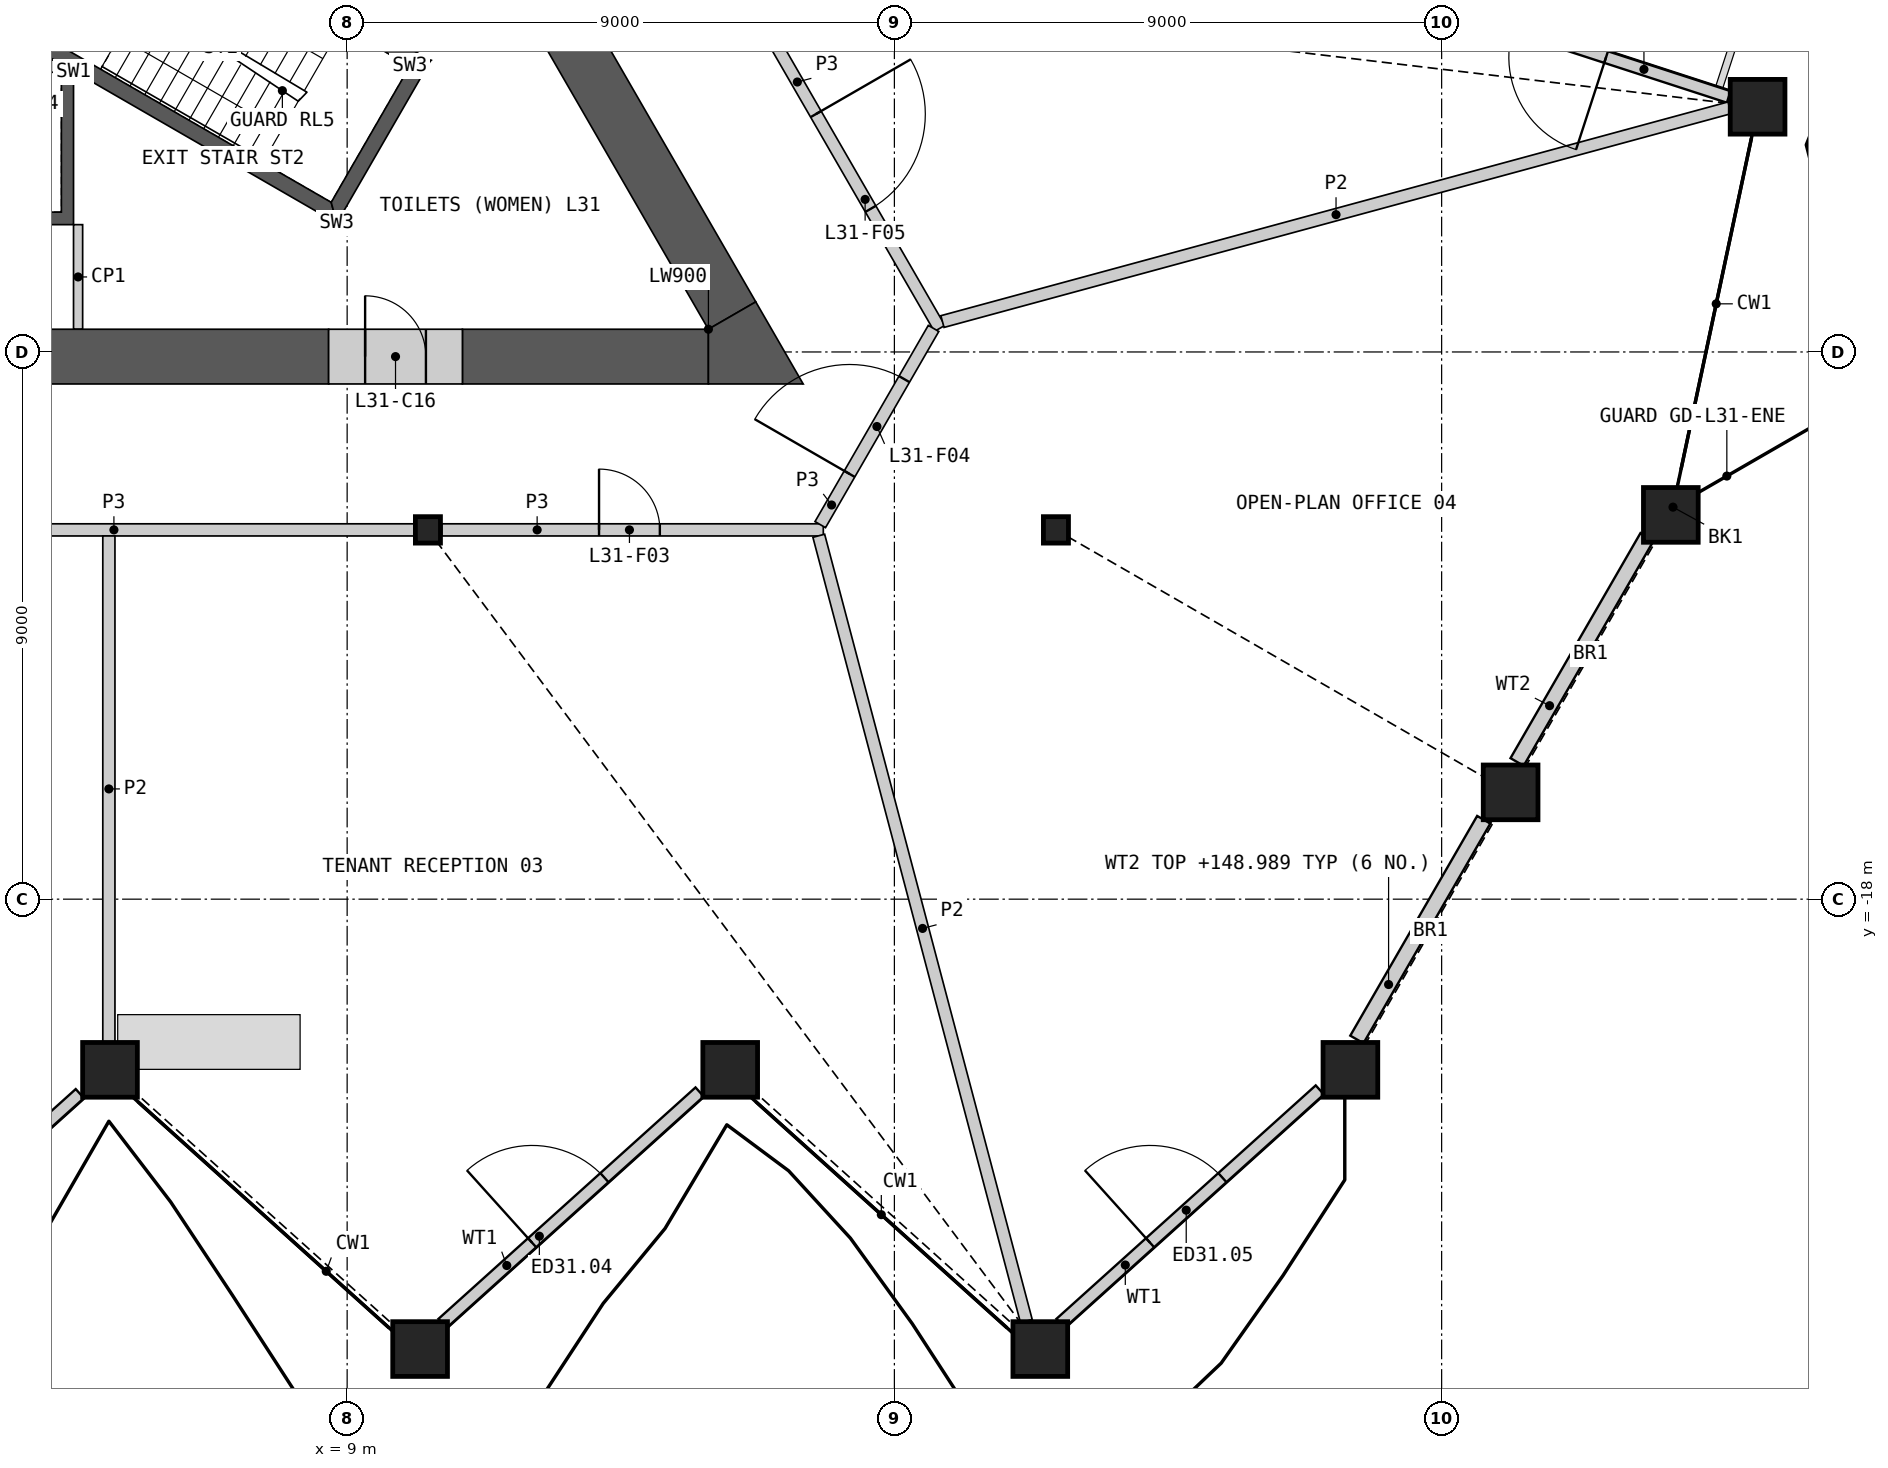
"""IFC4 building model, lengths in metres.
Left out: names, types, materials, properties, quantities, classifications, styles, units other than length and angle.
Written with IfcOpenShell. Run it as: python <this file> out.ifc"""

import sys

from ifc_helpers import new_model, si_unit, direction, frame, frame_2d, origin, origin_2d, place, context, subcontext, project, spatial, polyline, rectangle, hollow_rectangle, i_section, outline, extrude, element, fill, save


model = new_model("IFC4")
c1 = context("Model", 3, precision=1e-05, world=origin(), true_north=direction((0.0, 1.0)))
c2 = subcontext(c1, "Body", "Model", "MODEL_VIEW")
j1 = project(units=[si_unit("LENGTHUNIT", "METRE"), si_unit("PLANEANGLEUNIT", "RADIAN")], contexts=[c1])
p1 = place(None, origin())
s1 = spatial("IfcSite", under=j1, at=p1, CompositionType="ELEMENT")
p2 = place(p1, origin())
s2 = spatial("IfcBuilding", under=s1, at=p2, CompositionType="ELEMENT")
p3 = place(p2, frame((0.0, 0.0, 145.8)))
s3 = spatial("IfcBuildingStorey", under=s2, at=p3, CompositionType="ELEMENT", Elevation=145.8)
for number, where, z_axis, x_axis in (
    (1, (5.1, -20.807, 0.0), (0.0, 0.0, 1.0), (1.0, 0.0, 0.0)),
    (2, (10.2, -25.399, 0.0), (0.0, 0.0, 1.0), (1.0, 0.0, 0.0)),
    (3, (15.3, -20.807, 0.0), (0.0, 0.0, 1.0), (1.0, 0.0, 0.0)),
    (4, (20.4, -25.399, 0.0), (0.0, 0.0, 1.0), (1.0, 0.0, 0.0)),
    (5, (25.5, -20.807, 0.0), (0.0, 0.0, 1.0), (1.0, 0.0, 0.0)),
    (6, (28.135, -16.243, 0.0), (0.0, 0.0, 1.0), (1.0, 0.0, 0.0)),
    (7, (30.769, -11.68, 0.0), (0.0, 0.0, 1.0), (1.0, 0.0, 0.0)),
    (8, (32.196, -4.967, 0.0), (0.0, 0.0, 1.0), (1.0, 0.0, 0.0)),
):
    element("IfcColumn", number, at=place(p3, frame(where, z_axis=z_axis, x_axis=x_axis)), inside=s3, PredefinedType="COLUMN", context=c2, shape_type="SweptSolid", body=[
        extrude(hollow_rectangle(XDim=0.9, YDim=0.9, WallThickness=0.06, at=origin_2d()), origin(), (0.0, 0.0, 1.0), 4.2),
    ])
for number, where, z_axis, x_axis in (
    (9, (10.328, -11.926, 0.0), (0.0, 0.0, 1.0), (1.0, 0.0, 0.0)),
    (10, (20.657, -11.926, 0.0), (0.0, 0.0, 1.0), (1.0, 0.0, 0.0)),
):
    element("IfcColumn", number, at=place(p3, frame(where, z_axis=z_axis, x_axis=x_axis)), inside=s3, PredefinedType="COLUMN", context=c2, shape_type="SweptSolid", body=[
        extrude(i_section(OverallWidth=0.412, OverallDepth=0.435, WebThickness=0.036, FlangeThickness=0.057, at=origin_2d()), origin(), (0.0, 0.0, 1.0), 4.2),
    ])
p4 = place(p3, frame((0.406, -24.977, 0.0), z_axis=(0.0, 0.0, 1.0), x_axis=(0.743158726114, 0.669115167815, 0.0)))
e11 = element("IfcWall", 11, at=p4, inside=s3, PredefinedType="SOLIDWALL", context=c2, shape_type="SweptSolid", body=[
    extrude(rectangle(XDim=5.648, YDim=0.2, at=frame_2d((2.824, 0.0))), origin(), (0.0, 0.0, 1.0), 3.189),
])
p5 = place(p4, frame((1.983, 0.0, 0.0)))
e12 = element("IfcOpeningElement", 12, at=p5, cuts=e11, PredefinedType="OPENING", context=c2, shape_type="SweptSolid", body=[
    extrude(rectangle(XDim=1.6, YDim=2.4, at=frame_2d((0.8, 1.2))), frame((0.0, 0.11, 0.0), z_axis=(0.0, -1.0, 0.0), x_axis=(1.0, 0.0, 0.0)), (0.0, 0.0, 1.0), 0.22),
])
p6 = place(p3, frame((10.569, -24.977, 0.0), z_axis=(0.0, 0.0, 1.0), x_axis=(0.743151159824, 0.669123571287, 0.0)))
e13 = element("IfcWall", 13, at=p6, inside=s3, PredefinedType="SOLIDWALL", context=c2, shape_type="SweptSolid", body=[
    extrude(rectangle(XDim=5.689, YDim=0.2, at=frame_2d((2.844, 0.0))), origin(), (0.0, 0.0, 1.0), 3.189),
])
p7 = place(p6, frame((1.983, 0.0, 0.0)))
e14 = element("IfcOpeningElement", 14, at=p7, cuts=e13, PredefinedType="OPENING", context=c2, shape_type="SweptSolid", body=[
    extrude(rectangle(XDim=1.6, YDim=2.4, at=frame_2d((0.8, 1.2))), frame((0.0, 0.11, 0.0), z_axis=(0.0, -1.0, 0.0), x_axis=(1.0, 0.0, 0.0)), (0.0, 0.0, 1.0), 0.22),
])
p8 = place(p3, frame((20.731, -24.977, 0.0), z_axis=(0.0, 0.0, 1.0), x_axis=(0.743150280241, 0.669124548181, 0.0)))
e15 = element("IfcWall", 15, at=p8, inside=s3, PredefinedType="SOLIDWALL", context=c2, shape_type="SweptSolid", body=[
    extrude(rectangle(XDim=5.739, YDim=0.2, at=frame_2d((2.869, 0.0))), origin(), (0.0, 0.0, 1.0), 3.189),
])
p9 = place(p8, frame((1.983, 0.0, 0.0)))
e16 = element("IfcOpeningElement", 16, at=p9, cuts=e15, PredefinedType="OPENING", context=c2, shape_type="SweptSolid", body=[
    extrude(rectangle(XDim=1.6, YDim=2.4, at=frame_2d((0.8, 1.2))), frame((0.0, 0.11, 0.0), z_axis=(0.0, -1.0, 0.0), x_axis=(1.0, 0.0, 0.0)), (0.0, 0.0, 1.0), 0.22),
])
p10 = place(p3, frame((25.606, -20.307, 0.0), z_axis=(0.0, 0.0, 1.0), x_axis=(0.500002690545, 0.866023850392, 0.0)))
e17 = element("IfcWall", 17, at=p10, inside=s3, PredefinedType="SOLIDWALL", context=c2, shape_type="SweptSolid", body=[
    extrude(rectangle(XDim=4.173, YDim=0.25, at=frame_2d((2.086, 0.0))), origin(), (0.0, 0.0, 1.0), 3.189),
])
p11 = place(p3, frame((28.241, -15.743, 0.0), z_axis=(0.0, 0.0, 1.0), x_axis=(0.499995966399, 0.866027732573, 0.0)))
e18 = element("IfcWall", 18, at=p11, inside=s3, PredefinedType="SOLIDWALL", context=c2, shape_type="SweptSolid", body=[
    extrude(rectangle(XDim=4.275, YDim=0.25, at=frame_2d((2.138, 0.0))), origin(), (0.0, 0.0, 1.0), 3.189),
])
p12 = place(p3, frame((31.721, -4.805, 0.0), z_axis=(0.0, 0.0, 1.0), x_axis=(-0.951053952554, 0.309024884649, 0.0)))
e19 = element("IfcWall", 19, at=p12, inside=s3, PredefinedType="SOLIDWALL", context=c2, shape_type="SweptSolid", body=[
    extrude(rectangle(XDim=5.865, YDim=0.2, at=frame_2d((2.932, 0.0))), origin(), (0.0, 0.0, 1.0), 2.885),
])
p13 = place(p12, frame((2.12, 0.0, 0.0)))
e20 = element("IfcOpeningElement", 20, at=p13, cuts=e19, PredefinedType="OPENING", context=c2, shape_type="SweptSolid", body=[
    extrude(rectangle(XDim=1.6, YDim=2.4, at=frame_2d((0.8, 1.2))), frame((0.0, 0.11, 0.0), z_axis=(0.0, -1.0, 0.0), x_axis=(1.0, 0.0, 0.0)), (0.0, 0.0, 1.0), 0.22),
])
p14 = place(p3, origin())
e21 = element("IfcWall", 21, at=p14, inside=s3, PredefinedType="SHEAR", context=c2, shape_type="SweptSolid", body=[
    extrude(outline(polyline([(4.5, -4.4), (4.5, -6.906), (-4.5, -6.906), (-4.5, -4.4), (-4.3, -4.4), (-4.3, -6.7), (-2.3, -6.7), (-2.3, -4.4), (-2.1, -4.4), (-2.1, -6.7), (-0.1, -6.7), (-0.1, -4.4), (0.1, -4.4), (0.1, -6.7), (2.1, -6.7), (2.1, -4.4), (2.3, -4.4), (2.3, -6.7), (4.3, -6.7), (4.3, -4.4), (4.5, -4.4)])), origin(), (0.0, 0.0, 1.0), 3.8),
])
p15 = place(p3, frame((-4.187, -4.3, 0.0), z_axis=(0.0, 0.0, 1.0), x_axis=(1.0, 0.0, 0.0)))
e22 = element("IfcWall", 22, at=p15, inside=s3, PredefinedType="SOLIDWALL", context=c2, shape_type="SweptSolid", body=[
    extrude(rectangle(XDim=8.373, YDim=0.2, at=frame_2d((4.187, 0.0))), origin(), (0.0, 0.0, 1.0), 3.8),
])
p16 = place(p15, frame((0.287, 0.0, 0.0)))
e23 = element("IfcOpeningElement", 23, at=p16, cuts=e22, PredefinedType="OPENING", context=c2, shape_type="SweptSolid", body=[
    extrude(rectangle(XDim=1.2, YDim=2.1, at=frame_2d((0.6, 1.05))), frame((0.0, 0.11, 0.0), z_axis=(0.0, -1.0, 0.0), x_axis=(1.0, 0.0, 0.0)), (0.0, 0.0, 1.0), 0.22),
])
p17 = place(p15, frame((2.387, 0.0, 0.0)))
e24 = element("IfcOpeningElement", 24, at=p17, cuts=e22, PredefinedType="OPENING", context=c2, shape_type="SweptSolid", body=[
    extrude(rectangle(XDim=1.4, YDim=2.1, at=frame_2d((0.7, 1.05))), frame((0.0, 0.11, 0.0), z_axis=(0.0, -1.0, 0.0), x_axis=(1.0, 0.0, 0.0)), (0.0, 0.0, 1.0), 0.22),
])
p18 = place(p15, frame((4.737, 0.0, 0.0)))
e25 = element("IfcOpeningElement", 25, at=p18, cuts=e22, PredefinedType="OPENING", context=c2, shape_type="SweptSolid", body=[
    extrude(rectangle(XDim=1.1, YDim=2.1, at=frame_2d((0.55, 1.05))), frame((0.0, 0.11, 0.0), z_axis=(0.0, -1.0, 0.0), x_axis=(1.0, 0.0, 0.0)), (0.0, 0.0, 1.0), 0.22),
])
p19 = place(p15, frame((6.887, 0.0, 0.0)))
e26 = element("IfcOpeningElement", 26, at=p19, cuts=e22, PredefinedType="OPENING", context=c2, shape_type="SweptSolid", body=[
    extrude(rectangle(XDim=1.2, YDim=2.1, at=frame_2d((0.6, 1.05))), frame((0.0, 0.11, 0.0), z_axis=(0.0, -1.0, 0.0), x_axis=(1.0, 0.0, 0.0)), (0.0, 0.0, 1.0), 0.22),
])
p20 = place(p3, origin())
e27 = element("IfcWall", 27, at=p20, inside=s3, PredefinedType="SHEAR", context=c2, shape_type="SweptSolid", body=[
    extrude(outline(polyline([(3.763, -3.956), (8.83, -6.881), (8.738, -6.539), (3.888, -3.739), (3.763, -3.956)])), origin(), (0.0, 0.0, 1.0), 3.8),
])
p21 = place(p3, origin())
e28 = element("IfcWall", 28, at=p21, inside=s3, PredefinedType="SHEAR", context=c2, shape_type="SweptSolid", body=[
    extrude(outline(polyline([(8.83, -6.881), (10.374, -4.206), (10.032, -4.298), (8.738, -6.539), (8.83, -6.881)])), origin(), (0.0, 0.0, 1.0), 3.8),
])
p22 = place(p3, origin())
e29 = element("IfcWall", 29, at=p22, inside=s3, PredefinedType="SHEAR", context=c2, shape_type="SweptSolid", body=[
    extrude(outline(polyline([(10.032, -4.298), (10.374, -4.206), (5.307, -1.281), (5.182, -1.498), (10.032, -4.298)])), origin(), (0.0, 0.0, 1.0), 3.8),
])
p23 = place(p3, frame((4.575, -6.906, 0.0), z_axis=(0.0, 0.0, 1.0), x_axis=(0.0, -1.0, 0.0)))
e30 = element("IfcWall", 30, at=p23, inside=s3, PredefinedType="PARTITIONING", context=c2, shape_type="SweptSolid", body=[
    extrude(rectangle(XDim=1.72, YDim=0.15, at=frame_2d((0.86, 0.0))), origin(), (0.0, 0.0, 1.0), 3.8),
])
p24 = place(p3, frame((1.1, -9.076, 0.0), z_axis=(0.0, 0.0, 1.0), x_axis=(1.0, 0.0, 0.0)))
e31 = element("IfcWall", 31, at=p24, inside=s3, PredefinedType="SHEAR", context=c2, shape_type="SweptSolid", body=[
    extrude(rectangle(XDim=7.595, YDim=0.9, at=frame_2d((3.798, 0.0))), origin(), (0.0, 0.0, 1.0), 3.8),
])
p25 = place(p3, frame((10.896, -9.076, 0.0), z_axis=(0.0, 0.0, 1.0), x_axis=(1.0, 0.0, 0.0)))
e32 = element("IfcWall", 32, at=p25, inside=s3, PredefinedType="SHEAR", context=c2, shape_type="SweptSolid", body=[
    extrude(rectangle(XDim=4.046, YDim=0.9, at=frame_2d((2.023, 0.0))), origin(), (0.0, 0.0, 1.0), 3.8),
])
p26 = place(p3, frame((15.331, -8.401, 0.0), z_axis=(0.0, 0.0, 1.0), x_axis=(-0.499995375004, 0.86602807401, 0.0)))
e33 = element("IfcWall", 33, at=p26, inside=s3, PredefinedType="SHEAR", context=c2, shape_type="SweptSolid", body=[
    extrude(rectangle(XDim=11.718, YDim=0.9, at=frame_2d((5.859, 0.0))), origin(), (0.0, 0.0, 1.0), 3.8),
])
p27 = place(p3, origin())
e34 = element("IfcWall", 34, at=p27, inside=s3, PredefinedType="SHEAR", context=c2, shape_type="SweptSolid", body=[
    extrude(outline(polyline([(14.941, -8.626), (15.721, -8.176), (16.5, -9.526), (14.941, -9.526), (14.941, -8.626)])), origin(), (0.0, 0.0, 1.0), 3.8),
])
p28 = place(p3, frame((8.696, -9.076, 0.0), z_axis=(0.0, 0.0, 1.0), x_axis=(1.0, 0.0, 0.0)))
e35 = element("IfcWall", 35, at=p28, inside=s3, PredefinedType="SHEAR", context=c2, shape_type="SweptSolid", body=[
    extrude(rectangle(XDim=2.2, YDim=0.9, at=frame_2d((1.1, 0.0))), origin(), (0.0, 0.0, 1.0), 3.8),
])
p29 = place(p28, frame((0.6, 0.0, 0.0)))
e36 = element("IfcOpeningElement", 36, at=p29, cuts=e35, PredefinedType="OPENING", context=c2, shape_type="SweptSolid", body=[
    extrude(rectangle(XDim=1.0, YDim=2.1, at=frame_2d((0.5, 1.05))), frame((0.0, 0.46, 0.0), z_axis=(0.0, -1.0, 0.0), x_axis=(1.0, 0.0, 0.0)), (0.0, 0.0, 1.0), 0.92),
])
p30 = place(p3, frame((0.227, -11.926, 0.0), z_axis=(0.0, 0.0, 1.0), x_axis=(1.0, 0.0, 0.0)))
e37 = element("IfcWall", 37, at=p30, inside=s3, PredefinedType="PARTITIONING", context=c2, shape_type="SweptSolid", body=[
    extrude(rectangle(XDim=9.874, YDim=0.2, at=frame_2d((4.937, 0.0))), origin(), (0.0, 0.0, 1.0), 3.8),
])
p31 = place(p3, frame((10.556, -11.926, 0.0), z_axis=(0.0, 0.0, 1.0), x_axis=(1.0, 0.0, 0.0)))
e38 = element("IfcWall", 38, at=p31, inside=s3, PredefinedType="PARTITIONING", context=c2, shape_type="SweptSolid", body=[
    extrude(rectangle(XDim=6.275, YDim=0.2, at=frame_2d((3.137, 0.0))), origin(), (0.0, 0.0, 1.0), 3.8),
])
p32 = place(p31, frame((2.587, 0.0, 0.0)))
e39 = element("IfcOpeningElement", 39, at=p32, cuts=e38, PredefinedType="OPENING", context=c2, shape_type="SweptSolid", body=[
    extrude(rectangle(XDim=1.0, YDim=2.1, at=frame_2d((0.5, 1.05))), frame((0.0, 0.11, 0.0), z_axis=(0.0, -1.0, 0.0), x_axis=(1.0, 0.0, 0.0)), (0.0, 0.0, 1.0), 0.22),
])
p33 = place(p3, frame((15.624, -3.209, 0.0), z_axis=(0.0, 0.0, 1.0), x_axis=(0.499997920671, -0.866026604282, 0.0)))
e40 = element("IfcWall", 40, at=p33, inside=s3, PredefinedType="PARTITIONING", context=c2, shape_type="SweptSolid", body=[
    extrude(rectangle(XDim=6.24, YDim=0.2, at=frame_2d((3.12, 0.0))), origin(), (0.0, 0.0, 1.0), 3.8),
])
p34 = place(p33, frame((2.169, 0.0, 0.0)))
e41 = element("IfcOpeningElement", 41, at=p34, cuts=e40, PredefinedType="OPENING", context=c2, shape_type="SweptSolid", body=[
    extrude(rectangle(XDim=1.8, YDim=2.1, at=frame_2d((0.9, 1.05))), frame((0.0, 0.11, 0.0), z_axis=(0.0, -1.0, 0.0), x_axis=(1.0, 0.0, 0.0)), (0.0, 0.0, 1.0), 0.22),
])
p35 = place(p3, frame((16.781, -11.84, 0.0), z_axis=(0.0, 0.0, 1.0), x_axis=(0.499958791762, 0.866049194065, 0.0)))
e42 = element("IfcWall", 42, at=p35, inside=s3, PredefinedType="PARTITIONING", context=c2, shape_type="SweptSolid", body=[
    extrude(rectangle(XDim=3.726, YDim=0.2, at=frame_2d((1.863, 0.0))), origin(), (0.0, 0.0, 1.0), 3.8),
])
p36 = place(p35, frame((0.963, 0.0, 0.0)))
e43 = element("IfcOpeningElement", 43, at=p36, cuts=e42, PredefinedType="OPENING", context=c2, shape_type="SweptSolid", body=[
    extrude(rectangle(XDim=1.8, YDim=2.1, at=frame_2d((0.9, 1.05))), frame((0.0, 0.11, 0.0), z_axis=(0.0, -1.0, 0.0), x_axis=(1.0, 0.0, 0.0)), (0.0, 0.0, 1.0), 0.22),
])
p37 = place(p3, frame((18.79, -8.5, 0.0), z_axis=(0.0, 0.0, 1.0), x_axis=(0.965038802525, 0.262107057556, 0.0)))
e44 = element("IfcWall", 44, at=p37, inside=s3, PredefinedType="PARTITIONING", context=c2, shape_type="SweptSolid", body=[
    extrude(rectangle(XDim=13.415, YDim=0.2, at=frame_2d((6.708, 0.0))), origin(), (0.0, 0.0, 1.0), 2.885),
])
p38 = place(p3, frame((16.756, -12.023, 0.0), z_axis=(0.0, 0.0, 1.0), x_axis=(0.25554647156, -0.966796773305, 0.0)))
e45 = element("IfcWall", 45, at=p38, inside=s3, PredefinedType="PARTITIONING", context=c2, shape_type="SweptSolid", body=[
    extrude(rectangle(XDim=13.36, YDim=0.2, at=frame_2d((6.68, 0.0))), origin(), (0.0, 0.0, 1.0), 2.885),
])
p39 = place(p3, frame((5.081, -20.347, 0.0), z_axis=(0.0, 0.0, 1.0), x_axis=(0.0, 1.0, 0.0)))
e46 = element("IfcWall", 46, at=p39, inside=s3, PredefinedType="PARTITIONING", context=c2, shape_type="SweptSolid", body=[
    extrude(rectangle(XDim=8.321, YDim=0.2, at=frame_2d((4.16, 0.0))), origin(), (0.0, 0.0, 1.0), 2.885),
])
p40 = place(p7, origin())
e47 = element("IfcDoor", 47, at=p40, inside=s3, OperationType="DOUBLE_DOOR_SINGLE_SWING", PredefinedType="DOOR", context=c2, shape_type="SweptSolid", body=[
    extrude(rectangle(XDim=1.6, YDim=2.4, at=frame_2d((0.8, 1.2))), frame((0.0, 0.025, 0.0), z_axis=(0.0, -1.0, 0.0), x_axis=(1.0, 0.0, 0.0)), (0.0, 0.0, 1.0), 0.05),
])
fill(e14, e47)
p41 = place(p9, origin())
e48 = element("IfcDoor", 48, at=p41, inside=s3, OperationType="DOUBLE_DOOR_SINGLE_SWING", PredefinedType="DOOR", context=c2, shape_type="SweptSolid", body=[
    extrude(rectangle(XDim=1.6, YDim=2.4, at=frame_2d((0.8, 1.2))), frame((0.0, 0.025, 0.0), z_axis=(0.0, -1.0, 0.0), x_axis=(1.0, 0.0, 0.0)), (0.0, 0.0, 1.0), 0.05),
])
fill(e16, e48)
p42 = place(p13, origin())
e49 = element("IfcDoor", 49, at=p42, inside=s3, OperationType="DOUBLE_DOOR_SINGLE_SWING", PredefinedType="DOOR", context=c2, shape_type="SweptSolid", body=[
    extrude(rectangle(XDim=1.6, YDim=2.4, at=frame_2d((0.8, 1.2))), frame((0.0, 0.025, 0.0), z_axis=(0.0, -1.0, 0.0), x_axis=(1.0, 0.0, 0.0)), (0.0, 0.0, 1.0), 0.05),
])
fill(e20, e49)
p43 = place(p29, origin())
e50 = element("IfcDoor", 50, at=p43, inside=s3, OperationType="SINGLE_SWING_LEFT", PredefinedType="DOOR", context=c2, shape_type="SweptSolid", body=[
    extrude(rectangle(XDim=1.0, YDim=2.1, at=frame_2d((0.5, 1.05))), frame((0.0, 0.205, 0.0), z_axis=(0.0, -1.0, 0.0), x_axis=(1.0, 0.0, 0.0)), (0.0, 0.0, 1.0), 0.05),
])
fill(e36, e50)
p44 = place(p32, origin())
e51 = element("IfcDoor", 51, at=p44, inside=s3, OperationType="SINGLE_SWING_LEFT", PredefinedType="DOOR", context=c2, shape_type="SweptSolid", body=[
    extrude(rectangle(XDim=1.0, YDim=2.1, at=frame_2d((0.5, 1.05))), frame((0.0, 0.025, 0.0), z_axis=(0.0, -1.0, 0.0), x_axis=(1.0, 0.0, 0.0)), (0.0, 0.0, 1.0), 0.05),
])
fill(e39, e51)
p45 = place(p36, origin())
e52 = element("IfcDoor", 52, at=p45, inside=s3, OperationType="DOUBLE_DOOR_SINGLE_SWING", PredefinedType="DOOR", context=c2, shape_type="SweptSolid", body=[
    extrude(rectangle(XDim=1.8, YDim=2.1, at=frame_2d((0.9, 1.05))), frame((0.0, 0.025, 0.0), z_axis=(0.0, -1.0, 0.0), x_axis=(1.0, 0.0, 0.0)), (0.0, 0.0, 1.0), 0.05),
])
fill(e43, e52)
p46 = place(p34, origin())
e53 = element("IfcDoor", 53, at=p46, inside=s3, OperationType="DOUBLE_DOOR_SINGLE_SWING", PredefinedType="DOOR", context=c2, shape_type="SweptSolid", body=[
    extrude(rectangle(XDim=1.8, YDim=2.1, at=frame_2d((0.9, 1.05))), frame((0.0, 0.025, 0.0), z_axis=(0.0, -1.0, 0.0), x_axis=(1.0, 0.0, 0.0)), (0.0, 0.0, 1.0), 0.05),
])
fill(e41, e53)
save(model, sys.argv[1])
